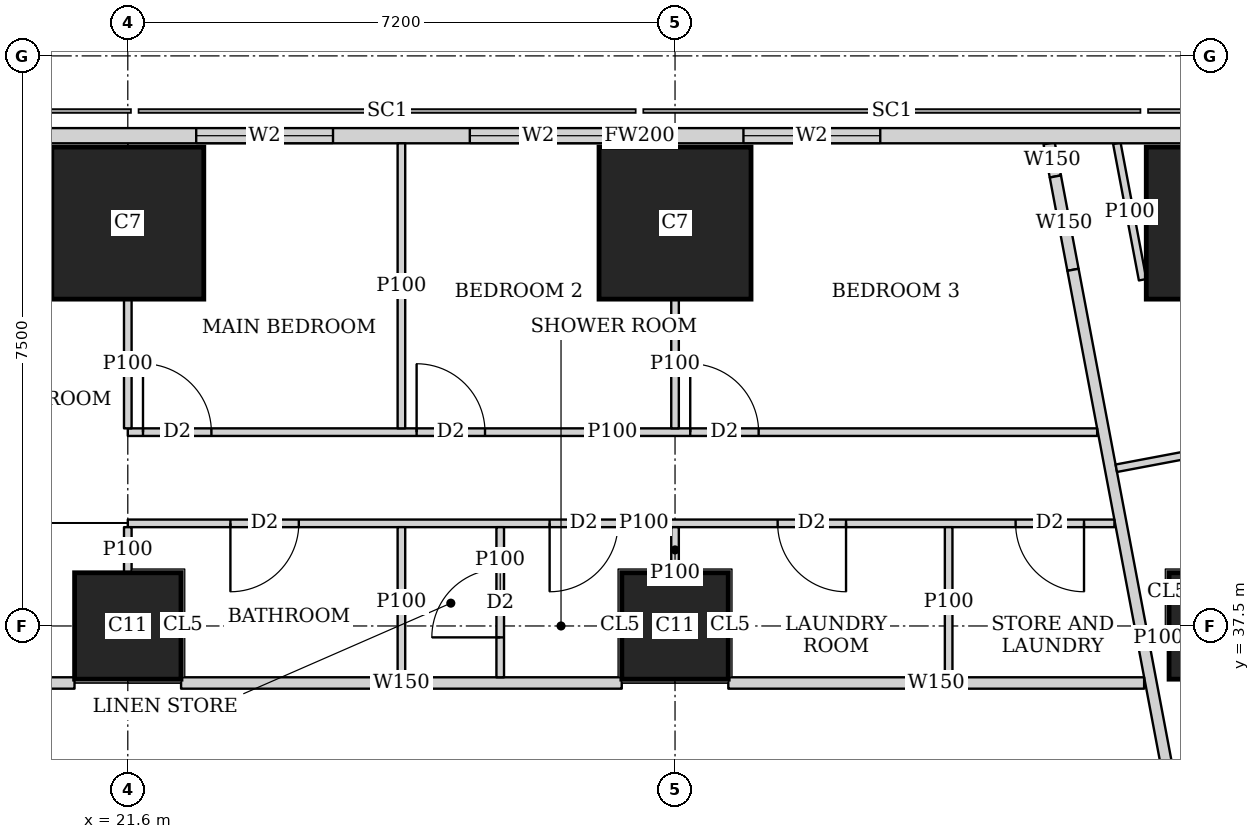
"""IFC4 building model, lengths in metres.
Left out: names, types, materials, properties, quantities, classifications, styles, units other than length and angle.
Written with IfcOpenShell. Run it as: python <this file> out.ifc"""

import sys

from ifc_helpers import new_model, si_unit, direction, frame, frame_2d, origin, origin_2d, place, context, subcontext, project, spatial, rectangle, extrude, element, fill, save


model = new_model("IFC4")
c1 = context("Model", 3, precision=1e-05, world=origin(), true_north=direction((0.0, 1.0)))
c2 = subcontext(c1, "Body", "Model", "MODEL_VIEW")
j1 = project(units=[si_unit("LENGTHUNIT", "METRE"), si_unit("PLANEANGLEUNIT", "RADIAN")], contexts=[c1])
p1 = place(None, origin())
s1 = spatial("IfcSite", under=j1, at=p1, CompositionType="ELEMENT")
p2 = place(p1, origin())
s2 = spatial("IfcBuilding", under=s1, at=p2, CompositionType="ELEMENT")
p3 = place(p2, frame((0.0, 0.0, 266.6)))
s3 = spatial("IfcBuildingStorey", under=s2, at=p3, CompositionType="ELEMENT", Elevation=266.6)
for number, where, z_axis, x_axis in (
    (1, (21.6, 37.5, 0.0), (0.0, 0.0, 1.0), (1.0, 0.0, 0.0)),
    (2, (28.8, 37.5, 0.0), (0.0, 0.0, 1.0), (1.0, 0.0, 0.0)),
    (3, (36.0, 37.5, 0.0), (0.0, 0.0, 1.0), (1.0, 0.0, 0.0)),
):
    element("IfcColumn", number, at=place(p3, frame(where, z_axis=z_axis, x_axis=x_axis)), inside=s3, PredefinedType="COLUMN", context=c2, shape_type="SweptSolid", body=[
        extrude(rectangle(XDim=1.4, YDim=1.4, at=origin_2d()), origin(), (0.0, 0.0, 1.0), 3.75),
    ])
for number, where, z_axis, x_axis in (
    (4, (21.6, 42.8, 0.0), (0.0, 0.0, 1.0), (1.0, 0.0, 0.0)),
    (5, (28.8, 42.8, 0.0), (0.0, 0.0, 1.0), (1.0, 0.0, 0.0)),
    (6, (36.0, 42.8, 0.0), (0.0, 0.0, 1.0), (1.0, 0.0, 0.0)),
):
    element("IfcColumn", number, at=place(p3, frame(where, z_axis=z_axis, x_axis=x_axis)), inside=s3, PredefinedType="COLUMN", context=c2, shape_type="SweptSolid", body=[
        extrude(rectangle(XDim=2.0, YDim=2.0, at=origin_2d()), origin(), (0.0, 0.0, 1.0), 3.75),
    ])
p4 = place(p3, frame((42.103, 43.95, 0.0), z_axis=(0.0, 0.0, 1.0), x_axis=(-1.0, 0.0, 0.0)))
e7 = element("IfcWall", 7, at=p4, inside=s3, PredefinedType="SOLIDWALL", context=c2, shape_type="SweptSolid", body=[
    extrude(rectangle(XDim=27.54, YDim=0.2, at=frame_2d((13.77, 0.0))), origin(), (0.0, 0.0, 1.0), 3.5),
])
p5 = place(p4, frame((10.603, 0.0, 0.9)))
e8 = element("IfcOpeningElement", 8, at=p5, cuts=e7, PredefinedType="OPENING", context=c2, shape_type="SweptSolid", body=[
    extrude(rectangle(XDim=1.8, YDim=1.5, at=frame_2d((0.9, 0.75))), frame((0.0, 0.11, 0.0), z_axis=(0.0, -1.0, 0.0), x_axis=(1.0, 0.0, 0.0)), (0.0, 0.0, 1.0), 0.22),
])
p6 = place(p4, frame((14.203, 0.0, 0.9)))
e9 = element("IfcOpeningElement", 9, at=p6, cuts=e7, PredefinedType="OPENING", context=c2, shape_type="SweptSolid", body=[
    extrude(rectangle(XDim=1.8, YDim=1.5, at=frame_2d((0.9, 0.75))), frame((0.0, 0.11, 0.0), z_axis=(0.0, -1.0, 0.0), x_axis=(1.0, 0.0, 0.0)), (0.0, 0.0, 1.0), 0.22),
])
p7 = place(p4, frame((17.803, 0.0, 0.9)))
e10 = element("IfcOpeningElement", 10, at=p7, cuts=e7, PredefinedType="OPENING", context=c2, shape_type="SweptSolid", body=[
    extrude(rectangle(XDim=1.8, YDim=1.5, at=frame_2d((0.9, 0.75))), frame((0.0, 0.11, 0.0), z_axis=(0.0, -1.0, 0.0), x_axis=(1.0, 0.0, 0.0)), (0.0, 0.0, 1.0), 0.22),
])
p8 = place(p4, frame((22.822, 0.0, 0.9)))
e11 = element("IfcOpeningElement", 11, at=p8, cuts=e7, PredefinedType="OPENING", context=c2, shape_type="SweptSolid", body=[
    extrude(rectangle(XDim=2.4, YDim=1.5, at=frame_2d((1.2, 0.75))), frame((0.0, 0.11, 0.0), z_axis=(0.0, -1.0, 0.0), x_axis=(1.0, 0.0, 0.0)), (0.0, 0.0, 1.0), 0.22),
])
p9 = place(p3, frame((16.001, 36.75, 0.0), z_axis=(0.0, 0.0, 1.0), x_axis=(1.0, 0.0, 0.0)))
e12 = element("IfcWall", 12, at=p9, inside=s3, PredefinedType="SOLIDWALL", context=c2, shape_type="SweptSolid", body=[
    extrude(rectangle(XDim=4.898, YDim=0.15, at=frame_2d((2.449, 0.0))), origin(), (0.0, 0.0, 1.0), 3.5),
])
p10 = place(p9, frame((1.074, 0.0, 0.0)))
e13 = element("IfcOpeningElement", 13, at=p10, cuts=e12, PredefinedType="OPENING", context=c2, shape_type="SweptSolid", body=[
    extrude(rectangle(XDim=1.0, YDim=2.1, at=frame_2d((0.5, 1.05))), frame((0.0, 0.085, 0.0), z_axis=(0.0, -1.0, 0.0), x_axis=(1.0, 0.0, 0.0)), (0.0, 0.0, 1.0), 0.17),
])
p11 = place(p3, frame((22.301, 36.75, 0.0), z_axis=(0.0, 0.0, 1.0), x_axis=(1.0, 0.0, 0.0)))
e14 = element("IfcWall", 14, at=p11, inside=s3, PredefinedType="SOLIDWALL", context=c2, shape_type="SweptSolid", body=[
    extrude(rectangle(XDim=5.798, YDim=0.15, at=frame_2d((2.899, 0.0))), origin(), (0.0, 0.0, 1.0), 3.5),
])
p12 = place(p3, frame((29.501, 36.75, 0.0), z_axis=(0.0, 0.0, 1.0), x_axis=(1.0, 0.0, 0.0)))
e15 = element("IfcWall", 15, at=p12, inside=s3, PredefinedType="SOLIDWALL", context=c2, shape_type="SweptSolid", body=[
    extrude(rectangle(XDim=5.471, YDim=0.15, at=frame_2d((2.735, 0.0))), origin(), (0.0, 0.0, 1.0), 3.5),
])
p13 = place(p3, frame((33.722, 43.85, 0.0), z_axis=(0.0, 0.0, 1.0), x_axis=(0.184886516626, -0.982759877066, 0.0)))
e16 = element("IfcWall", 16, at=p13, inside=s3, PredefinedType="SOLIDWALL", context=c2, shape_type="SweptSolid", body=[
    extrude(rectangle(XDim=0.444, YDim=0.15, at=frame_2d((0.222, 0.0))), origin(), (0.0, 0.0, 1.0), 3.5),
])
p14 = place(p3, frame((33.804, 43.414, 0.0), z_axis=(0.0, 0.0, 1.0), x_axis=(0.185585816539, -0.982628060204, 0.0)))
e17 = element("IfcWall", 17, at=p14, inside=s3, PredefinedType="SOLIDWALL", context=c2, shape_type="SweptSolid", body=[
    extrude(rectangle(XDim=1.25, YDim=0.15, at=frame_2d((0.625, 0.0))), origin(), (0.0, 0.0, 1.0), 2.05),
])
p15 = place(p3, frame((34.036, 42.186, 0.0), z_axis=(0.0, 0.0, 1.0), x_axis=(0.185593518645, -0.9826266055, 0.0)))
e18 = element("IfcWall", 18, at=p15, inside=s3, PredefinedType="SOLIDWALL", context=c2, shape_type="SweptSolid", body=[
    extrude(rectangle(XDim=35.961, YDim=0.15, at=frame_2d((17.98, 0.0))), origin(), (0.0, 0.0, 1.0), 2.5),
])
p16 = place(p15, frame((15.529, 0.0, 0.0)))
e19 = element("IfcOpeningElement", 19, at=p16, cuts=e18, PredefinedType="OPENING", context=c2, shape_type="SweptSolid", body=[
    extrude(rectangle(XDim=1.0, YDim=2.1, at=frame_2d((0.5, 1.05))), frame((0.0, 0.085, 0.0), z_axis=(0.0, -1.0, 0.0), x_axis=(1.0, 0.0, 0.0)), (0.0, 0.0, 1.0), 0.17),
])
p17 = place(p15, frame((19.345, 0.0, 0.0)))
e20 = element("IfcOpeningElement", 20, at=p17, cuts=e18, PredefinedType="OPENING", context=c2, shape_type="SweptSolid", body=[
    extrude(rectangle(XDim=1.0, YDim=2.1, at=frame_2d((0.5, 1.05))), frame((0.0, 0.085, 0.0), z_axis=(0.0, -1.0, 0.0), x_axis=(1.0, 0.0, 0.0)), (0.0, 0.0, 1.0), 0.17),
])
p18 = place(p15, frame((30.594, 0.0, 0.0)))
e21 = element("IfcOpeningElement", 21, at=p18, cuts=e18, PredefinedType="OPENING", context=c2, shape_type="SweptSolid", body=[
    extrude(rectangle(XDim=1.0, YDim=2.1, at=frame_2d((0.5, 1.05))), frame((0.0, 0.085, 0.0), z_axis=(0.0, -1.0, 0.0), x_axis=(1.0, 0.0, 0.0)), (0.0, 0.0, 1.0), 0.17),
])
p19 = place(p3, frame((34.952, 42.055, 0.0), z_axis=(0.0, 0.0, 1.0), x_axis=(-0.185490642006, 0.98264603074, 0.0)))
e22 = element("IfcWall", 22, at=p19, inside=s3, PredefinedType="PARTITIONING", context=c2, shape_type="SweptSolid", body=[
    extrude(rectangle(XDim=1.827, YDim=0.1, at=frame_2d((0.914, 0.0))), origin(), (0.0, 0.0, 1.0), 2.05),
])
p20 = place(p3, frame((37.824, 40.182, 0.0), z_axis=(0.0, 0.0, 1.0), x_axis=(-0.982674977865, -0.185337227447, 0.0)))
e23 = element("IfcWall", 23, at=p20, inside=s3, PredefinedType="PARTITIONING", context=c2, shape_type="SweptSolid", body=[
    extrude(rectangle(XDim=3.275, YDim=0.1, at=frame_2d((1.637, 0.0))), origin(), (0.0, 0.0, 1.0), 3.5),
])
p21 = place(p3, frame((35.29, 37.366, 0.0), z_axis=(0.0, 0.0, 1.0), x_axis=(-0.982395465615, -0.18681313963, 0.0)))
e24 = element("IfcWall", 24, at=p21, inside=s3, PredefinedType="PARTITIONING", context=c2, shape_type="SweptSolid", body=[
    extrude(rectangle(XDim=0.263, YDim=0.1, at=frame_2d((0.131, 0.0))), origin(), (0.0, 0.0, 1.0), 3.5),
])
p22 = place(p3, frame((21.6, 40.05, 0.0), z_axis=(0.0, 0.0, 1.0), x_axis=(1.0, 0.0, 0.0)))
e25 = element("IfcWall", 25, at=p22, inside=s3, PredefinedType="PARTITIONING", context=c2, shape_type="SweptSolid", body=[
    extrude(rectangle(XDim=12.754, YDim=0.1, at=frame_2d((6.377, 0.0))), origin(), (0.0, 0.0, 1.0), 3.5),
])
p23 = place(p22, frame((0.2, 0.0, 0.0)))
e26 = element("IfcOpeningElement", 26, at=p23, cuts=e25, PredefinedType="OPENING", context=c2, shape_type="SweptSolid", body=[
    extrude(rectangle(XDim=0.9, YDim=2.1, at=frame_2d((0.45, 1.05))), frame((0.0, 0.06, 0.0), z_axis=(0.0, -1.0, 0.0), x_axis=(1.0, 0.0, 0.0)), (0.0, 0.0, 1.0), 0.12),
])
p24 = place(p22, frame((3.8, 0.0, 0.0)))
e27 = element("IfcOpeningElement", 27, at=p24, cuts=e25, PredefinedType="OPENING", context=c2, shape_type="SweptSolid", body=[
    extrude(rectangle(XDim=0.9, YDim=2.1, at=frame_2d((0.45, 1.05))), frame((0.0, 0.06, 0.0), z_axis=(0.0, -1.0, 0.0), x_axis=(1.0, 0.0, 0.0)), (0.0, 0.0, 1.0), 0.12),
])
p25 = place(p22, frame((7.4, 0.0, 0.0)))
e28 = element("IfcOpeningElement", 28, at=p25, cuts=e25, PredefinedType="OPENING", context=c2, shape_type="SweptSolid", body=[
    extrude(rectangle(XDim=0.9, YDim=2.1, at=frame_2d((0.45, 1.05))), frame((0.0, 0.06, 0.0), z_axis=(0.0, -1.0, 0.0), x_axis=(1.0, 0.0, 0.0)), (0.0, 0.0, 1.0), 0.12),
])
p26 = place(p3, frame((21.6, 38.85, 0.0), z_axis=(0.0, 0.0, 1.0), x_axis=(1.0, 0.0, 0.0)))
e29 = element("IfcWall", 29, at=p26, inside=s3, PredefinedType="PARTITIONING", context=c2, shape_type="SweptSolid", body=[
    extrude(rectangle(XDim=12.981, YDim=0.1, at=frame_2d((6.49, 0.0))), origin(), (0.0, 0.0, 1.0), 3.5),
])
p27 = place(p26, frame((1.35, 0.0, 0.0)))
e30 = element("IfcOpeningElement", 30, at=p27, cuts=e29, PredefinedType="OPENING", context=c2, shape_type="SweptSolid", body=[
    extrude(rectangle(XDim=0.9, YDim=2.1, at=frame_2d((0.45, 1.05))), frame((0.0, 0.06, 0.0), z_axis=(0.0, -1.0, 0.0), x_axis=(1.0, 0.0, 0.0)), (0.0, 0.0, 1.0), 0.12),
])
p28 = place(p26, frame((5.55, 0.0, 0.0)))
e31 = element("IfcOpeningElement", 31, at=p28, cuts=e29, PredefinedType="OPENING", context=c2, shape_type="SweptSolid", body=[
    extrude(rectangle(XDim=0.9, YDim=2.1, at=frame_2d((0.45, 1.05))), frame((0.0, 0.06, 0.0), z_axis=(0.0, -1.0, 0.0), x_axis=(1.0, 0.0, 0.0)), (0.0, 0.0, 1.0), 0.12),
])
p29 = place(p26, frame((8.55, 0.0, 0.0)))
e32 = element("IfcOpeningElement", 32, at=p29, cuts=e29, PredefinedType="OPENING", context=c2, shape_type="SweptSolid", body=[
    extrude(rectangle(XDim=0.9, YDim=2.1, at=frame_2d((0.45, 1.05))), frame((0.0, 0.06, 0.0), z_axis=(0.0, -1.0, 0.0), x_axis=(1.0, 0.0, 0.0)), (0.0, 0.0, 1.0), 0.12),
])
p30 = place(p26, frame((11.681, 0.0, 0.0)))
e33 = element("IfcOpeningElement", 33, at=p30, cuts=e29, PredefinedType="OPENING", context=c2, shape_type="SweptSolid", body=[
    extrude(rectangle(XDim=0.9, YDim=2.1, at=frame_2d((0.45, 1.05))), frame((0.0, 0.06, 0.0), z_axis=(0.0, -1.0, 0.0), x_axis=(1.0, 0.0, 0.0)), (0.0, 0.0, 1.0), 0.12),
])
p31 = place(p3, frame((21.6, 40.1, 0.0), z_axis=(0.0, 0.0, 1.0), x_axis=(0.0, 1.0, 0.0)))
e34 = element("IfcWall", 34, at=p31, inside=s3, PredefinedType="PARTITIONING", context=c2, shape_type="SweptSolid", body=[
    extrude(rectangle(XDim=1.699, YDim=0.1, at=frame_2d((0.85, 0.0))), origin(), (0.0, 0.0, 1.0), 3.5),
])
p32 = place(p3, frame((25.2, 40.1, 0.0), z_axis=(0.0, 0.0, 1.0), x_axis=(0.0, 1.0, 0.0)))
e35 = element("IfcWall", 35, at=p32, inside=s3, PredefinedType="PARTITIONING", context=c2, shape_type="SweptSolid", body=[
    extrude(rectangle(XDim=3.75, YDim=0.1, at=frame_2d((1.875, 0.0))), origin(), (0.0, 0.0, 1.0), 2.05),
])
p33 = place(p3, frame((28.8, 40.1, 0.0), z_axis=(0.0, 0.0, 1.0), x_axis=(0.0, 1.0, 0.0)))
e36 = element("IfcWall", 36, at=p33, inside=s3, PredefinedType="PARTITIONING", context=c2, shape_type="SweptSolid", body=[
    extrude(rectangle(XDim=1.699, YDim=0.1, at=frame_2d((0.85, 0.0))), origin(), (0.0, 0.0, 1.0), 3.5),
])
p34 = place(p3, frame((21.6, 38.201, 0.0), z_axis=(0.0, 0.0, 1.0), x_axis=(0.0, 1.0, 0.0)))
e37 = element("IfcWall", 37, at=p34, inside=s3, PredefinedType="PARTITIONING", context=c2, shape_type="SweptSolid", body=[
    extrude(rectangle(XDim=0.599, YDim=0.1, at=frame_2d((0.3, 0.0))), origin(), (0.0, 0.0, 1.0), 3.5),
])
p35 = place(p3, frame((25.2, 36.825, 0.0), z_axis=(0.0, 0.0, 1.0), x_axis=(0.0, 1.0, 0.0)))
e38 = element("IfcWall", 38, at=p35, inside=s3, PredefinedType="PARTITIONING", context=c2, shape_type="SweptSolid", body=[
    extrude(rectangle(XDim=1.975, YDim=0.1, at=frame_2d((0.988, 0.0))), origin(), (0.0, 0.0, 1.0), 3.5),
])
p36 = place(p3, frame((28.8, 38.201, 0.0), z_axis=(0.0, 0.0, 1.0), x_axis=(0.0, 1.0, 0.0)))
e39 = element("IfcWall", 39, at=p36, inside=s3, PredefinedType="PARTITIONING", context=c2, shape_type="SweptSolid", body=[
    extrude(rectangle(XDim=0.599, YDim=0.1, at=frame_2d((0.3, 0.0))), origin(), (0.0, 0.0, 1.0), 3.5),
])
p37 = place(p3, frame((32.4, 36.825, 0.0), z_axis=(0.0, 0.0, 1.0), x_axis=(0.0, 1.0, 0.0)))
e40 = element("IfcWall", 40, at=p37, inside=s3, PredefinedType="PARTITIONING", context=c2, shape_type="SweptSolid", body=[
    extrude(rectangle(XDim=1.975, YDim=0.1, at=frame_2d((0.988, 0.0))), origin(), (0.0, 0.0, 1.0), 3.5),
])
p38 = place(p3, frame((26.5, 36.825, 0.0), z_axis=(0.0, 0.0, 1.0), x_axis=(0.0, 1.0, 0.0)))
e41 = element("IfcWall", 41, at=p38, inside=s3, PredefinedType="PARTITIONING", context=c2, shape_type="SweptSolid", body=[
    extrude(rectangle(XDim=1.975, YDim=0.1, at=frame_2d((0.988, 0.0))), origin(), (0.0, 0.0, 1.0), 3.5),
])
p39 = place(p38, frame((0.525, 0.0, 0.0)))
e42 = element("IfcOpeningElement", 42, at=p39, cuts=e41, PredefinedType="OPENING", context=c2, shape_type="SweptSolid", body=[
    extrude(rectangle(XDim=0.9, YDim=2.1, at=frame_2d((0.45, 1.05))), frame((0.0, 0.06, 0.0), z_axis=(0.0, -1.0, 0.0), x_axis=(1.0, 0.0, 0.0)), (0.0, 0.0, 1.0), 0.12),
])
p40 = place(p5, origin())
e43 = element("IfcWindow", 43, at=p40, inside=s3, PartitioningType="SINGLE_PANEL", PredefinedType="WINDOW", context=c2, shape_type="SweptSolid", body=[
    extrude(rectangle(XDim=1.8, YDim=1.5, at=frame_2d((0.9, 0.75))), frame((0.0, 0.03, 0.0), z_axis=(0.0, -1.0, 0.0), x_axis=(1.0, 0.0, 0.0)), (0.0, 0.0, 1.0), 0.06),
])
fill(e8, e43)
p41 = place(p6, origin())
e44 = element("IfcWindow", 44, at=p41, inside=s3, PartitioningType="SINGLE_PANEL", PredefinedType="WINDOW", context=c2, shape_type="SweptSolid", body=[
    extrude(rectangle(XDim=1.8, YDim=1.5, at=frame_2d((0.9, 0.75))), frame((0.0, 0.03, 0.0), z_axis=(0.0, -1.0, 0.0), x_axis=(1.0, 0.0, 0.0)), (0.0, 0.0, 1.0), 0.06),
])
fill(e9, e44)
p42 = place(p7, origin())
e45 = element("IfcWindow", 45, at=p42, inside=s3, PartitioningType="SINGLE_PANEL", PredefinedType="WINDOW", context=c2, shape_type="SweptSolid", body=[
    extrude(rectangle(XDim=1.8, YDim=1.5, at=frame_2d((0.9, 0.75))), frame((0.0, 0.03, 0.0), z_axis=(0.0, -1.0, 0.0), x_axis=(1.0, 0.0, 0.0)), (0.0, 0.0, 1.0), 0.06),
])
fill(e10, e45)
p43 = place(p23, origin())
e46 = element("IfcDoor", 46, at=p43, inside=s3, OperationType="SINGLE_SWING_LEFT", PredefinedType="DOOR", context=c2, shape_type="SweptSolid", body=[
    extrude(rectangle(XDim=0.9, YDim=2.1, at=frame_2d((0.45, 1.05))), frame((0.0, 0.025, 0.0), z_axis=(0.0, -1.0, 0.0), x_axis=(1.0, 0.0, 0.0)), (0.0, 0.0, 1.0), 0.05),
])
fill(e26, e46)
p44 = place(p24, origin())
e47 = element("IfcDoor", 47, at=p44, inside=s3, OperationType="SINGLE_SWING_LEFT", PredefinedType="DOOR", context=c2, shape_type="SweptSolid", body=[
    extrude(rectangle(XDim=0.9, YDim=2.1, at=frame_2d((0.45, 1.05))), frame((0.0, 0.025, 0.0), z_axis=(0.0, -1.0, 0.0), x_axis=(1.0, 0.0, 0.0)), (0.0, 0.0, 1.0), 0.05),
])
fill(e27, e47)
p45 = place(p25, origin())
e48 = element("IfcDoor", 48, at=p45, inside=s3, OperationType="SINGLE_SWING_LEFT", PredefinedType="DOOR", context=c2, shape_type="SweptSolid", body=[
    extrude(rectangle(XDim=0.9, YDim=2.1, at=frame_2d((0.45, 1.05))), frame((0.0, 0.025, 0.0), z_axis=(0.0, -1.0, 0.0), x_axis=(1.0, 0.0, 0.0)), (0.0, 0.0, 1.0), 0.05),
])
fill(e28, e48)
p46 = place(p27, origin())
e49 = element("IfcDoor", 49, at=p46, inside=s3, OperationType="SINGLE_SWING_RIGHT", PredefinedType="DOOR", context=c2, shape_type="SweptSolid", body=[
    extrude(rectangle(XDim=0.9, YDim=2.1, at=frame_2d((0.45, 1.05))), frame((0.0, 0.025, 0.0), z_axis=(0.0, -1.0, 0.0), x_axis=(1.0, 0.0, 0.0)), (0.0, 0.0, 1.0), 0.05),
])
fill(e30, e49)
p47 = place(p28, origin())
e50 = element("IfcDoor", 50, at=p47, inside=s3, OperationType="SINGLE_SWING_RIGHT", PredefinedType="DOOR", context=c2, shape_type="SweptSolid", body=[
    extrude(rectangle(XDim=0.9, YDim=2.1, at=frame_2d((0.45, 1.05))), frame((0.0, 0.025, 0.0), z_axis=(0.0, -1.0, 0.0), x_axis=(1.0, 0.0, 0.0)), (0.0, 0.0, 1.0), 0.05),
])
fill(e31, e50)
p48 = place(p29, origin())
e51 = element("IfcDoor", 51, at=p48, inside=s3, OperationType="SINGLE_SWING_LEFT", PredefinedType="DOOR", context=c2, shape_type="SweptSolid", body=[
    extrude(rectangle(XDim=0.9, YDim=2.1, at=frame_2d((0.45, 1.05))), frame((0.0, 0.025, 0.0), z_axis=(0.0, -1.0, 0.0), x_axis=(1.0, 0.0, 0.0)), (0.0, 0.0, 1.0), 0.05),
])
fill(e32, e51)
p49 = place(p30, origin())
e52 = element("IfcDoor", 52, at=p49, inside=s3, OperationType="SINGLE_SWING_LEFT", PredefinedType="DOOR", context=c2, shape_type="SweptSolid", body=[
    extrude(rectangle(XDim=0.9, YDim=2.1, at=frame_2d((0.45, 1.05))), frame((0.0, 0.025, 0.0), z_axis=(0.0, -1.0, 0.0), x_axis=(1.0, 0.0, 0.0)), (0.0, 0.0, 1.0), 0.05),
])
fill(e33, e52)
p50 = place(p39, origin())
e53 = element("IfcDoor", 53, at=p50, inside=s3, OperationType="SINGLE_SWING_LEFT", PredefinedType="DOOR", context=c2, shape_type="SweptSolid", body=[
    extrude(rectangle(XDim=0.9, YDim=2.1, at=frame_2d((0.45, 1.05))), frame((0.0, 0.025, 0.0), z_axis=(0.0, -1.0, 0.0), x_axis=(1.0, 0.0, 0.0)), (0.0, 0.0, 1.0), 0.05),
])
fill(e42, e53)
save(model, sys.argv[1])
